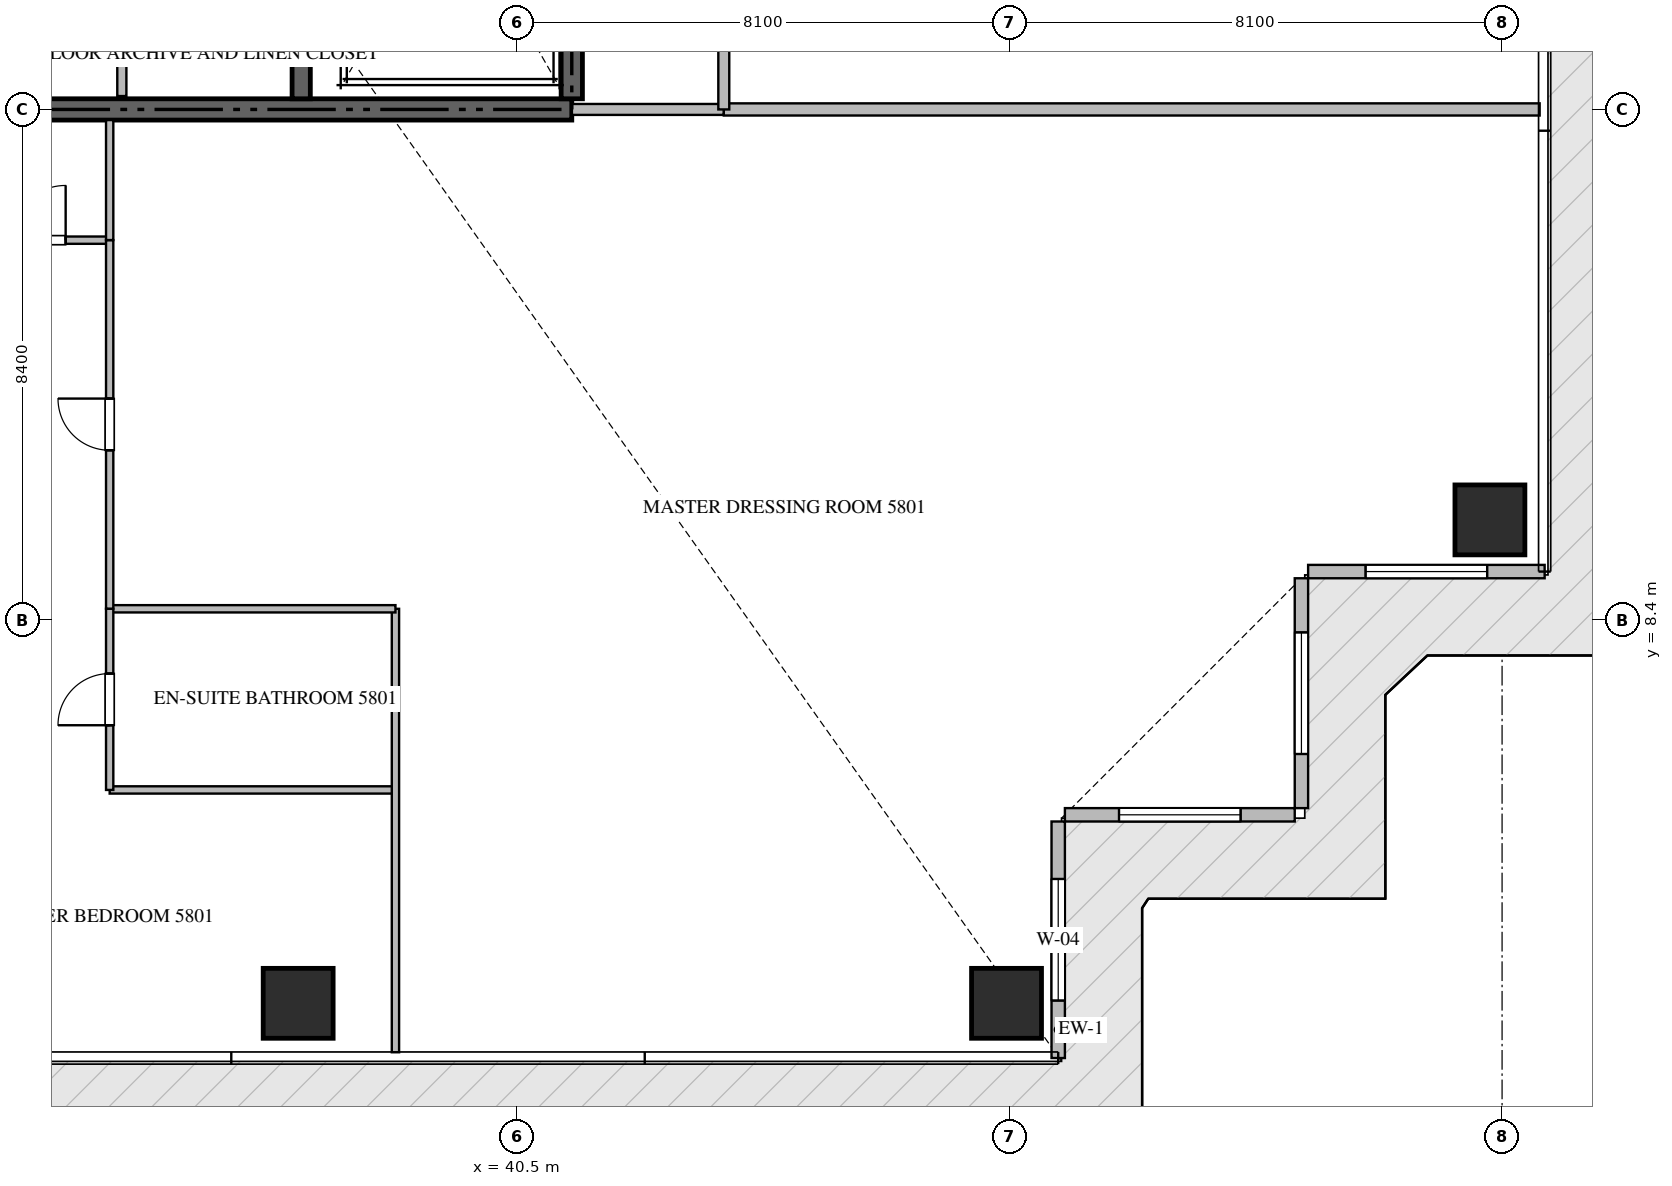
"""IFC4 building model, lengths in metres.
Left out: names, types, materials, properties, quantities, classifications, styles, units other than length and angle.
Written with IfcOpenShell. Run it as: python <this file> out.ifc"""

import sys

from ifc_helpers import new_model, si_unit, direction, frame, frame_2d, origin, origin_2d, place, context, subcontext, project, spatial, rectangle, extrude, source, transform, mapped, element, fill, save


model = new_model("IFC4")
c1 = context("Model", 3, precision=1e-05, world=origin(), true_north=direction((0.0, 1.0)))
c2 = subcontext(c1, "Body", "Model", "MODEL_VIEW")
j1 = project(units=[si_unit("LENGTHUNIT", "METRE"), si_unit("PLANEANGLEUNIT", "RADIAN")], contexts=[c1])
p1 = place(None, origin())
s1 = spatial("IfcSite", under=j1, at=p1, CompositionType="ELEMENT")
p2 = place(p1, origin())
s2 = spatial("IfcBuilding", under=s1, at=p2, CompositionType="ELEMENT")
p3 = place(p2, frame((0.0, 0.0, 233.55)))
s3 = spatial("IfcBuildingStorey", under=s2, at=p3, CompositionType="ELEMENT", Elevation=233.55)
p4 = place(p3, frame((23.4, 16.8, -0.26), z_axis=(0.0, 0.0, 1.0), x_axis=(1.0, 0.0, 0.0)))
e1 = element("IfcWall", 1, at=p4, inside=s3, PredefinedType="SHEAR", context=c2, shape_type="SweptSolid", body=[
    extrude(rectangle(XDim=18.0, YDim=0.35, at=frame_2d((9.0, 0.0))), origin(), (0.0, 0.0, 1.0), 3.848),
])
p5 = place(p3, frame((41.4, 16.975, -0.26), z_axis=(0.0, 0.0, 1.0), x_axis=(0.0, 1.0, 0.0)))
e2 = element("IfcWall", 2, at=p5, inside=s3, PredefinedType="SHEAR", context=c2, shape_type="SweptSolid", body=[
    extrude(rectangle(XDim=8.375, YDim=0.35, at=frame_2d((4.188, 0.0))), origin(), (0.0, 0.0, 1.0), 3.848),
])
p6 = place(p3, frame((36.95, 16.975, -0.26), z_axis=(0.0, 0.0, 1.0), x_axis=(0.0, 1.0, 0.0)))
e3 = element("IfcWall", 3, at=p6, inside=s3, PredefinedType="SHEAR", context=c2, shape_type="SweptSolid", body=[
    extrude(rectangle(XDim=8.375, YDim=0.3, at=frame_2d((4.188, 0.0))), origin(), (0.0, 0.0, 1.0), 3.848),
])
m1 = source(origin(), c2, "Body", "SweptSolid", [
    extrude(rectangle(XDim=1.15, YDim=1.15, at=origin_2d()), origin(), (0.0, 0.0, 1.0), 3.85),
])
for number, where, z_axis, x_axis in (
    (4, (36.9, 2.1, -0.26), (0.0, 0.0, 1.0), (1.0, 0.0, 0.0)),
    (5, (48.55, 2.1, -0.26), (0.0, 0.0, 1.0), (1.0, 0.0, 0.0)),
    (6, (56.5, 10.05, -0.26), (0.0, 0.0, 1.0), (1.0, 0.0, 0.0)),
):
    element("IfcColumn", number, at=place(p3, frame(where, z_axis=z_axis, x_axis=x_axis)), inside=s3, PredefinedType="COLUMN", context=c2, shape_type="MappedRepresentation", body=[
        mapped(m1, transform((0.0, 0.0, 0.0), scale=1.0)),
    ])
p7 = place(p3, frame((49.4, 1.2, 0.0), z_axis=(0.0, 0.0, 1.0), x_axis=(0.0, 1.0, 0.0)))
e7 = element("IfcWall", 7, at=p7, inside=s3, PredefinedType="ELEMENTEDWALL", context=c2, shape_type="SweptSolid", body=[
    extrude(rectangle(XDim=3.89, YDim=0.22, at=frame_2d((1.945, 0.0))), origin(), (0.0, 0.0, 1.0), 3.575),
])
p8 = place(p7, frame((0.945, 0.0, 0.65)))
e8 = element("IfcOpeningElement", 8, at=p8, cuts=e7, PredefinedType="OPENING", context=c2, shape_type="SweptSolid", body=[
    extrude(rectangle(XDim=2.0, YDim=2.2, at=frame_2d((1.0, 1.1))), frame((0.0, 0.12, 0.0), z_axis=(0.0, -1.0, 0.0), x_axis=(1.0, 0.0, 0.0)), (0.0, 0.0, 1.0), 0.24),
])
p9 = place(p3, frame((49.51, 5.2, 0.0), z_axis=(0.0, 0.0, 1.0), x_axis=(1.0, 0.0, 0.0)))
e9 = element("IfcWall", 9, at=p9, inside=s3, PredefinedType="ELEMENTEDWALL", context=c2, shape_type="SweptSolid", body=[
    extrude(rectangle(XDim=3.78, YDim=0.22, at=frame_2d((1.89, 0.0))), origin(), (0.0, 0.0, 1.0), 3.575),
])
p10 = place(p9, frame((0.89, 0.0, 0.65)))
e10 = element("IfcOpeningElement", 10, at=p10, cuts=e9, PredefinedType="OPENING", context=c2, shape_type="SweptSolid", body=[
    extrude(rectangle(XDim=2.0, YDim=2.2, at=frame_2d((1.0, 1.1))), frame((0.0, 0.12, 0.0), z_axis=(0.0, -1.0, 0.0), x_axis=(1.0, 0.0, 0.0)), (0.0, 0.0, 1.0), 0.24),
])
p11 = place(p3, frame((53.4, 5.31, 0.0), z_axis=(0.0, 0.0, 1.0), x_axis=(0.0, 1.0, 0.0)))
e11 = element("IfcWall", 11, at=p11, inside=s3, PredefinedType="ELEMENTEDWALL", context=c2, shape_type="SweptSolid", body=[
    extrude(rectangle(XDim=3.78, YDim=0.22, at=frame_2d((1.89, 0.0))), origin(), (0.0, 0.0, 1.0), 3.575),
])
p12 = place(p11, frame((0.89, 0.0, 0.65)))
e12 = element("IfcOpeningElement", 12, at=p12, cuts=e11, PredefinedType="OPENING", context=c2, shape_type="SweptSolid", body=[
    extrude(rectangle(XDim=2.0, YDim=2.2, at=frame_2d((1.0, 1.1))), frame((0.0, 0.12, 0.0), z_axis=(0.0, -1.0, 0.0), x_axis=(1.0, 0.0, 0.0)), (0.0, 0.0, 1.0), 0.24),
])
p13 = place(p3, frame((53.51, 9.2, 0.0), z_axis=(0.0, 0.0, 1.0), x_axis=(1.0, 0.0, 0.0)))
e13 = element("IfcWall", 13, at=p13, inside=s3, PredefinedType="ELEMENTEDWALL", context=c2, shape_type="SweptSolid", body=[
    extrude(rectangle(XDim=3.89, YDim=0.22, at=frame_2d((1.945, 0.0))), origin(), (0.0, 0.0, 1.0), 3.575),
])
p14 = place(p13, frame((0.945, 0.0, 0.65)))
e14 = element("IfcOpeningElement", 14, at=p14, cuts=e13, PredefinedType="OPENING", context=c2, shape_type="SweptSolid", body=[
    extrude(rectangle(XDim=2.0, YDim=2.2, at=frame_2d((1.0, 1.1))), frame((0.0, 0.12, 0.0), z_axis=(0.0, -1.0, 0.0), x_axis=(1.0, 0.0, 0.0)), (0.0, 0.0, 1.0), 0.24),
])
p15 = place(p3, frame((34.0, 17.02, 0.0), z_axis=(0.0, 0.0, 1.0), x_axis=(0.0, 1.0, 0.0)))
e15 = element("IfcWall", 15, at=p15, inside=s3, PredefinedType="PARTITIONING", context=c2, shape_type="SweptSolid", body=[
    extrude(rectangle(XDim=2.73, YDim=0.15, at=frame_2d((1.365, 0.0))), origin(), (0.0, 0.0, 1.0), 3.59),
])
p16 = place(p3, frame((43.9, 16.8, 0.0), z_axis=(0.0, 0.0, 1.0), x_axis=(1.0, 0.0, 0.0)))
e16 = element("IfcWall", 16, at=p16, inside=s3, PredefinedType="PARTITIONING", context=c2, shape_type="SweptSolid", body=[
    extrude(rectangle(XDim=13.418, YDim=0.2, at=frame_2d((6.709, 0.0))), origin(), (0.0, 0.0, 1.0), 3.59),
])
p17 = place(p3, frame((41.402, 16.8, 0.0), z_axis=(0.0, 0.0, 1.0), x_axis=(1.0, 0.0, 0.0)))
e17 = element("IfcWall", 17, at=p17, inside=s3, PredefinedType="PARTITIONING", context=c2, shape_type="SweptSolid", body=[
    extrude(rectangle(XDim=2.496, YDim=0.18, at=frame_2d((1.248, 0.0))), origin(), (0.0, 0.0, 1.0), 3.59),
])
p18 = place(p3, frame((43.9, 16.8, 0.0), z_axis=(0.0, 0.0, 1.0), x_axis=(0.0, 1.0, 0.0)))
e18 = element("IfcWall", 18, at=p18, inside=s3, PredefinedType="PARTITIONING", context=c2, shape_type="SweptSolid", body=[
    extrude(rectangle(XDim=16.8, YDim=0.18, at=frame_2d((8.4, 0.0))), origin(), (0.0, 0.0, 1.0), 3.59),
])
p19 = place(p18, frame((1.3, 0.0, 0.0)))
e19 = element("IfcOpeningElement", 19, at=p19, cuts=e18, PredefinedType="OPENING", context=c2, shape_type="SweptSolid", body=[
    extrude(rectangle(XDim=1.0, YDim=2.15, at=frame_2d((0.5, 1.075))), frame((0.0, 0.1, 0.0), z_axis=(0.0, -1.0, 0.0), x_axis=(1.0, 0.0, 0.0)), (0.0, 0.0, 1.0), 0.2),
])
p20 = place(p3, frame((31.452, 14.65, 0.0), z_axis=(0.0, 0.0, 1.0), x_axis=(1.0, 0.0, 0.0)))
e20 = element("IfcWall", 20, at=p20, inside=s3, PredefinedType="PARTITIONING", context=c2, shape_type="SweptSolid", body=[
    extrude(rectangle(XDim=2.348, YDim=0.12, at=frame_2d((1.174, 0.0))), origin(), (0.0, 0.0, 1.0), 3.59),
])
p21 = place(p20, frame((0.724, 0.0, 0.0)))
e21 = element("IfcOpeningElement", 21, at=p21, cuts=e20, PredefinedType="OPENING", context=c2, shape_type="SweptSolid", body=[
    extrude(rectangle(XDim=0.9, YDim=2.1, at=frame_2d((0.45, 1.05))), frame((0.0, 0.07, 0.0), z_axis=(0.0, -1.0, 0.0), x_axis=(1.0, 0.0, 0.0)), (0.0, 0.0, 1.0), 0.14),
])
p22 = place(p3, frame((33.8, 5.609, 0.0), z_axis=(0.0, 0.0, 1.0), x_axis=(1.0, 0.0, 0.0)))
e22 = element("IfcWall", 22, at=p22, inside=s3, PredefinedType="PARTITIONING", context=c2, shape_type="SweptSolid", body=[
    extrude(rectangle(XDim=4.7, YDim=0.12, at=frame_2d((2.35, 0.0))), origin(), (0.0, 0.0, 1.0), 3.59),
])
p23 = place(p3, frame((38.5, 1.295, 0.0), z_axis=(0.0, 0.0, 1.0), x_axis=(0.0, 1.0, 0.0)))
e23 = element("IfcWall", 23, at=p23, inside=s3, PredefinedType="PARTITIONING", context=c2, shape_type="SweptSolid", body=[
    extrude(rectangle(XDim=7.293, YDim=0.12, at=frame_2d((3.646, 0.0))), origin(), (0.0, 0.0, 1.0), 3.59),
])
p24 = place(p3, frame((33.8, 8.588, 0.0), z_axis=(0.0, 0.0, 1.0), x_axis=(1.0, 0.0, 0.0)))
e24 = element("IfcWall", 24, at=p24, inside=s3, PredefinedType="PARTITIONING", context=c2, shape_type="SweptSolid", body=[
    extrude(rectangle(XDim=4.7, YDim=0.12, at=frame_2d((2.35, 0.0))), origin(), (0.0, 0.0, 1.0), 3.59),
])
p25 = place(p3, frame((33.8, 5.609, 0.0), z_axis=(0.0, 0.0, 1.0), x_axis=(0.0, 1.0, 0.0)))
e25 = element("IfcWall", 25, at=p25, inside=s3, PredefinedType="PARTITIONING", context=c2, shape_type="SweptSolid", body=[
    extrude(rectangle(XDim=2.979, YDim=0.12, at=frame_2d((1.49, 0.0))), origin(), (0.0, 0.0, 1.0), 3.59),
])
p26 = place(p25, frame((1.064, 0.0, 0.0)))
e26 = element("IfcOpeningElement", 26, at=p26, cuts=e25, PredefinedType="OPENING", context=c2, shape_type="SweptSolid", body=[
    extrude(rectangle(XDim=0.85, YDim=2.1, at=frame_2d((0.425, 1.05))), frame((0.0, 0.07, 0.0), z_axis=(0.0, -1.0, 0.0), x_axis=(1.0, 0.0, 0.0)), (0.0, 0.0, 1.0), 0.14),
])
p27 = place(p3, frame((33.8, 8.59, 0.0), z_axis=(0.0, 0.0, 1.0), x_axis=(0.0, 1.0, 0.0)))
e27 = element("IfcWall", 27, at=p27, inside=s3, PredefinedType="PARTITIONING", context=c2, shape_type="SweptSolid", body=[
    extrude(rectangle(XDim=6.06, YDim=0.12, at=frame_2d((3.03, 0.0))), origin(), (0.0, 0.0, 1.0), 3.59),
])
p28 = place(p27, frame((2.605, 0.0, 0.0)))
e28 = element("IfcOpeningElement", 28, at=p28, cuts=e27, PredefinedType="OPENING", context=c2, shape_type="SweptSolid", body=[
    extrude(rectangle(XDim=0.85, YDim=2.1, at=frame_2d((0.425, 1.05))), frame((0.0, 0.07, 0.0), z_axis=(0.0, -1.0, 0.0), x_axis=(1.0, 0.0, 0.0)), (0.0, 0.0, 1.0), 0.14),
])
p29 = place(p3, frame((33.8, 14.652, 0.0), z_axis=(0.0, 0.0, 1.0), x_axis=(0.0, 1.0, 0.0)))
e29 = element("IfcWall", 29, at=p29, inside=s3, PredefinedType="PARTITIONING", context=c2, shape_type="SweptSolid", body=[
    extrude(rectangle(XDim=1.973, YDim=0.12, at=frame_2d((0.986, 0.0))), origin(), (0.0, 0.0, 1.0), 3.59),
])
m2 = source(origin(), c2, "Body", "SweptSolid", [
    extrude(rectangle(XDim=2.0, YDim=2.2, at=frame_2d((1.0, 1.1))), frame((0.0, 0.03, 0.0), z_axis=(0.0, -1.0, 0.0), x_axis=(1.0, 0.0, 0.0)), (0.0, 0.0, 1.0), 0.06),
])
p30 = place(p8, origin())
e30 = element("IfcWindow", 30, at=p30, inside=s3, PartitioningType="SINGLE_PANEL", PredefinedType="WINDOW", context=c2, shape_type="MappedRepresentation", body=[
    mapped(m2, transform((0.0, 0.0, 0.0), scale=1.0)),
])
fill(e8, e30)
p31 = place(p10, origin())
e31 = element("IfcWindow", 31, at=p31, inside=s3, PartitioningType="SINGLE_PANEL", PredefinedType="WINDOW", context=c2, shape_type="MappedRepresentation", body=[
    mapped(m2, transform((0.0, 0.0, 0.0), scale=1.0)),
])
fill(e10, e31)
p32 = place(p12, origin())
e32 = element("IfcWindow", 32, at=p32, inside=s3, PartitioningType="SINGLE_PANEL", PredefinedType="WINDOW", context=c2, shape_type="MappedRepresentation", body=[
    mapped(m2, transform((0.0, 0.0, 0.0), scale=1.0)),
])
fill(e12, e32)
p33 = place(p14, origin())
e33 = element("IfcWindow", 33, at=p33, inside=s3, PartitioningType="SINGLE_PANEL", PredefinedType="WINDOW", context=c2, shape_type="MappedRepresentation", body=[
    mapped(m2, transform((0.0, 0.0, 0.0), scale=1.0)),
])
fill(e14, e33)
m3 = source(origin(), c2, "Body", "SweptSolid", [
    extrude(rectangle(XDim=0.9, YDim=2.1, at=frame_2d((0.45, 1.05))), frame((0.0, 0.025, 0.0), z_axis=(0.0, -1.0, 0.0), x_axis=(1.0, 0.0, 0.0)), (0.0, 0.0, 1.0), 0.05),
])
p34 = place(p21, origin())
e34 = element("IfcDoor", 34, at=p34, inside=s3, OperationType="SINGLE_SWING_RIGHT", PredefinedType="DOOR", context=c2, shape_type="MappedRepresentation", body=[
    mapped(m3, transform((0.0, 0.0, 0.0), scale=1.0)),
])
fill(e21, e34)
m4 = source(origin(), c2, "Body", "SweptSolid", [
    extrude(rectangle(XDim=0.85, YDim=2.1, at=frame_2d((0.425, 1.05))), frame((0.0, 0.025, 0.0), z_axis=(0.0, -1.0, 0.0), x_axis=(1.0, 0.0, 0.0)), (0.0, 0.0, 1.0), 0.05),
])
p35 = place(p26, origin())
e35 = element("IfcDoor", 35, at=p35, inside=s3, OperationType="SINGLE_SWING_LEFT", PredefinedType="DOOR", context=c2, shape_type="MappedRepresentation", body=[
    mapped(m4, transform((0.0, 0.0, 0.0), scale=1.0)),
])
fill(e26, e35)
p36 = place(p28, origin())
e36 = element("IfcDoor", 36, at=p36, inside=s3, OperationType="SINGLE_SWING_RIGHT", PredefinedType="DOOR", context=c2, shape_type="MappedRepresentation", body=[
    mapped(m4, transform((0.0, 0.0, 0.0), scale=1.0)),
])
fill(e28, e36)
save(model, sys.argv[1])
